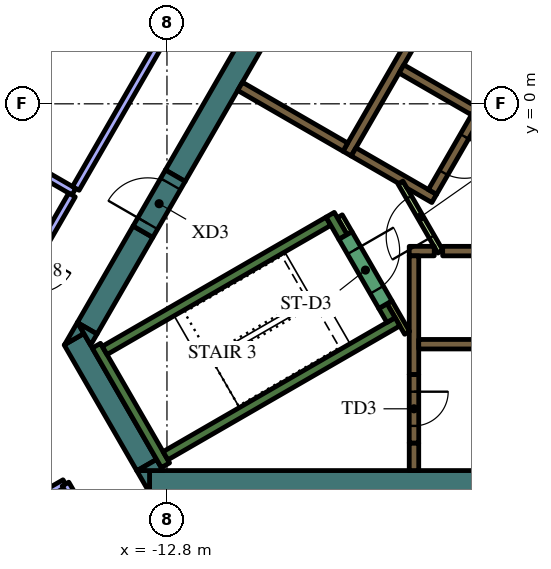
"""IFC4 building model, lengths in metres.
Left out: names, types, materials, properties, quantities, classifications, styles, units other than length and angle.
Written with IfcOpenShell. Run it as: python <this file> out.ifc"""

import sys

from ifc_helpers import new_model, si_unit, direction, frame, frame_2d, origin, place, context, subcontext, project, spatial, polyline, rectangle, outline, extrude, element, fill, save


model = new_model("IFC4")
c1 = context("Model", 3, precision=1e-05, world=origin(), true_north=direction((0.0, 1.0)))
c2 = subcontext(c1, "Body", "Model", "MODEL_VIEW")
j1 = project(units=[si_unit("LENGTHUNIT", "METRE"), si_unit("PLANEANGLEUNIT", "RADIAN")], contexts=[c1])
p1 = place(None, origin())
s1 = spatial("IfcSite", under=j1, at=p1, CompositionType="ELEMENT")
p2 = place(p1, origin())
s2 = spatial("IfcBuilding", under=s1, at=p2, CompositionType="ELEMENT")
p3 = place(p2, frame((0.0, 0.0, 309.0)))
s3 = spatial("IfcBuildingStorey", under=s2, at=p3, CompositionType="ELEMENT", Elevation=309.0)
p4 = place(p3, frame((8.904, -9.95, 0.0), z_axis=(0.0, 0.0, 1.0), x_axis=(-1.0, 0.0, 0.0)))
e1 = element("IfcWall", 1, at=p4, inside=s3, PredefinedType="SOLIDWALL", context=c2, shape_type="SweptSolid", body=[
    extrude(rectangle(XDim=22.161, YDim=0.6, at=frame_2d((11.081, 0.0))), origin(), (0.0, 0.0, 1.0), 4.2),
])
p5 = place(p3, origin())
e2 = element("IfcWall", 2, at=p5, inside=s3, PredefinedType="SOLIDWALL", context=c2, shape_type="SweptSolid", body=[
    extrude(outline(polyline([(-13.597, -9.65), (-13.259, -9.65), (-13.259, -10.236), (-13.597, -9.65)])), origin(), (0.0, 0.0, 1.0), 4.2),
])
p6 = place(p3, frame((-13.333, -9.506, 0.0), z_axis=(0.0, 0.0, 1.0), x_axis=(-0.500019073792, 0.866014391245, 0.0)))
e3 = element("IfcWall", 3, at=p6, inside=s3, PredefinedType="SOLIDWALL", context=c2, shape_type="SweptSolid", body=[
    extrude(rectangle(XDim=3.823, YDim=0.6, at=frame_2d((1.912, 0.0))), origin(), (0.0, 0.0, 1.0), 4.2),
])
e4 = element("IfcWall", 4, at=p5, inside=s3, PredefinedType="SOLIDWALL", context=c2, shape_type="SweptSolid", body=[
    extrude(outline(polyline([(-14.987, -6.043), (-15.493, -6.335), (-15.156, -5.75), (-14.987, -6.043)])), origin(), (0.0, 0.0, 1.0), 4.2),
])
e5 = element("IfcWall", 5, at=p5, inside=s3, PredefinedType="SOLIDWALL", context=c2, shape_type="SweptSolid", body=[
    extrude(outline(polyline([(-12.904, -9.65), (-13.58, -9.65), (-13.073, -9.357), (-12.904, -9.65)])), origin(), (0.0, 0.0, 1.0), 4.2),
])
p7 = place(p3, frame((-13.432, -3.364, 0.0), z_axis=(0.0, 0.0, 1.0), x_axis=(-0.499960127962, -0.866048422692, 0.0)))
e6 = element("IfcWall", 6, at=p7, inside=s3, PredefinedType="SOLIDWALL", context=c2, shape_type="SweptSolid", body=[
    extrude(rectangle(XDim=2.934, YDim=0.6, at=frame_2d((1.467, 0.0))), origin(), (0.0, 0.0, 1.0), 4.2),
])
e7 = element("IfcWall", 7, at=p5, inside=s3, PredefinedType="SOLIDWALL", context=c2, shape_type="SweptSolid", body=[
    extrude(outline(polyline([(-14.809, -6.35), (-15.147, -5.764), (-14.64, -6.057), (-14.809, -6.35)])), origin(), (0.0, 0.0, 1.0), 4.2),
])
p8 = place(p3, frame((-12.582, -1.892, 0.0), z_axis=(0.0, 0.0, 1.0), x_axis=(0.500003640647, 0.866023301845, 0.0)))
e8 = element("IfcWall", 8, at=p8, inside=s3, PredefinedType="SOLIDWALL", context=c2, shape_type="SweptSolid", body=[
    extrude(rectangle(XDim=15.858, YDim=0.6, at=frame_2d((7.929, 0.0))), origin(), (0.0, 0.0, 1.0), 4.2),
])
p9 = place(p3, frame((-12.84, -9.511, 0.0), z_axis=(0.0, 0.0, 1.0), x_axis=(-0.499997733992, 0.866026712061, 0.0)))
e9 = element("IfcWall", 9, at=p9, inside=s3, PredefinedType="SOLIDWALL", context=c2, shape_type="SweptSolid", body=[
    extrude(rectangle(XDim=3.634, YDim=0.25, at=frame_2d((1.817, 0.0))), origin(), (0.0, 0.0, 1.0), 4.2),
])
p10 = place(p3, frame((-14.44, -6.49, 0.0), z_axis=(0.0, 0.0, 1.0), x_axis=(0.866022966069, 0.500004222222, 0.0)))
e10 = element("IfcWall", 10, at=p10, inside=s3, PredefinedType="SOLIDWALL", context=c2, shape_type="SweptSolid", body=[
    extrude(rectangle(XDim=6.8, YDim=0.25, at=frame_2d((3.4, 0.0))), origin(), (0.0, 0.0, 1.0), 4.2),
])
p11 = place(p3, frame((-8.168, -3.503, 0.0), z_axis=(0.0, 0.0, 1.0), x_axis=(-0.499952099219, 0.866053057547, 0.0)))
e11 = element("IfcWall", 11, at=p11, inside=s3, PredefinedType="SOLIDWALL", context=c2, shape_type="SweptSolid", body=[
    extrude(rectangle(XDim=0.675, YDim=0.25, at=frame_2d((0.337, 0.0))), origin(), (0.0, 0.0, 1.0), 4.2),
])
p12 = place(p3, frame((-12.84, -9.261, 0.0), z_axis=(0.0, 0.0, 1.0), x_axis=(0.866016039709, 0.500016218704, 0.0)))
e12 = element("IfcWall", 12, at=p12, inside=s3, PredefinedType="SOLIDWALL", context=c2, shape_type="SweptSolid", body=[
    extrude(rectangle(XDim=7.05, YDim=0.25, at=frame_2d((3.525, 0.0))), origin(), (0.0, 0.0, 1.0), 4.2),
])
p13 = place(p3, frame((-6.905, -5.69, 0.0), z_axis=(0.0, 0.0, 1.0), x_axis=(-0.500402024738, 0.865793170242, 0.0)))
e13 = element("IfcWall", 13, at=p13, inside=s3, PredefinedType="SOLIDWALL", context=c2, shape_type="SweptSolid", body=[
    extrude(rectangle(XDim=0.425, YDim=0.25, at=frame_2d((0.212, 0.0))), origin(), (0.0, 0.0, 1.0), 4.2),
])
p14 = place(p3, frame((-5.545, -3.875, 0.0), z_axis=(0.0, 0.0, 1.0), x_axis=(1.0, 0.0, 0.0)))
e14 = element("IfcWall", 14, at=p14, inside=s3, PredefinedType="SOLIDWALL", context=c2, shape_type="SweptSolid", body=[
    extrude(rectangle(XDim=11.97, YDim=0.25, at=frame_2d((5.985, 0.0))), origin(), (0.0, 0.0, 1.0), 4.2),
])
p15 = place(p3, frame((-6.425, -3.875, 0.0), z_axis=(0.0, 0.0, 1.0), x_axis=(1.0, 0.0, 0.0)))
e15 = element("IfcWall", 15, at=p15, inside=s3, PredefinedType="SOLIDWALL", context=c2, shape_type="SweptSolid", body=[
    extrude(rectangle(XDim=0.658, YDim=0.25, at=frame_2d((0.329, 0.0))), origin(), (0.0, 0.0, 1.0), 4.2),
])
p16 = place(p3, frame((-6.3, -7.125, 0.0), z_axis=(0.0, 0.0, 1.0), x_axis=(0.0, 1.0, 0.0)))
e16 = element("IfcWall", 16, at=p16, inside=s3, PredefinedType="SOLIDWALL", context=c2, shape_type="SweptSolid", body=[
    extrude(rectangle(XDim=3.125, YDim=0.25, at=frame_2d((1.562, 0.0))), origin(), (0.0, 0.0, 1.0), 4.2),
])
p17 = place(p3, frame((-6.3, -8.925, 0.0), z_axis=(0.0, 0.0, 1.0), x_axis=(0.0, -1.0, 0.0)))
e17 = element("IfcWall", 17, at=p17, inside=s3, PredefinedType="SOLIDWALL", context=c2, shape_type="SweptSolid", body=[
    extrude(rectangle(XDim=0.725, YDim=0.25, at=frame_2d((0.363, 0.0))), origin(), (0.0, 0.0, 1.0), 4.2),
])
p18 = place(p3, frame((-8.06, -1.311, 0.0), z_axis=(0.0, 0.0, 1.0), x_axis=(0.50000273126, 0.866023826885, 0.0)))
e18 = element("IfcWall", 18, at=p18, inside=s3, PredefinedType="SOLIDWALL", context=c2, shape_type="SweptSolid", body=[
    extrude(rectangle(XDim=10.33, YDim=0.25, at=frame_2d((5.165, 0.0))), origin(), (0.0, 0.0, 1.0), 4.2),
])
p19 = place(p3, frame((-4.724, -0.182, 0.0), z_axis=(0.0, 0.0, 1.0), x_axis=(-0.866008176907, 0.50002983664, 0.0)))
e19 = element("IfcWall", 19, at=p19, inside=s3, PredefinedType="SOLIDWALL", context=c2, shape_type="SweptSolid", body=[
    extrude(rectangle(XDim=2.2, YDim=0.25, at=frame_2d((1.1, 0.0))), origin(), (0.0, 0.0, 1.0), 4.2),
])
e20 = element("IfcWall", 20, at=p5, inside=s3, PredefinedType="SOLIDWALL", context=c2, shape_type="SweptSolid", body=[
    extrude(outline(polyline([(-5.922, -2.257), (-5.922, -2.257), (-5.705, -2.382), (-5.83, -2.598), (-6.483, -2.221), (-6.591, -2.033), (-6.591, -2.033), (-6.7, -2.096), (-7.952, -1.373), (-7.827, -1.156), (-5.922, -2.257)])), origin(), (0.0, 0.0, 1.0), 4.2),
])
p20 = place(p3, frame((-8.106, -1.14, 0.0), z_axis=(0.0, 0.0, 1.0), x_axis=(-0.866008981251, 0.500028443584, 0.0)))
e21 = element("IfcWall", 21, at=p20, inside=s3, PredefinedType="SOLIDWALL", context=c2, shape_type="SweptSolid", body=[
    extrude(rectangle(XDim=3.2, YDim=0.25, at=frame_2d((1.6, 0.0))), origin(), (0.0, 0.0, 1.0), 4.2),
])
p21 = place(p3, frame((-8.252, -2.958, 0.0), z_axis=(0.0, 0.0, 1.0), x_axis=(0.500174715838, -0.865924508047, 0.0)))
e22 = element("IfcWall", 22, at=p21, inside=s3, PredefinedType="PARTITIONING", context=c2, shape_type="SweptSolid", body=[
    extrude(rectangle(XDim=0.514, YDim=0.15, at=frame_2d((0.257, 0.0))), origin(), (0.0, 0.0, 1.0), 3.55),
])
p22 = place(p3, frame((-6.48, -6.027, 0.0), z_axis=(0.0, 0.0, 1.0), x_axis=(-0.499927229454, 0.866067413802, 0.0)))
e23 = element("IfcWall", 23, at=p22, inside=s3, PredefinedType="PARTITIONING", context=c2, shape_type="SweptSolid", body=[
    extrude(rectangle(XDim=0.929, YDim=0.15, at=frame_2d((0.464, 0.0))), origin(), (0.0, 0.0, 1.0), 4.2),
])
p23 = place(p3, frame((-6.175, -6.325, 0.0), z_axis=(0.0, 0.0, 1.0), x_axis=(1.0, 0.0, 0.0)))
e24 = element("IfcWall", 24, at=p23, inside=s3, PredefinedType="SOLIDWALL", context=c2, shape_type="SweptSolid", body=[
    extrude(rectangle(XDim=12.35, YDim=0.25, at=frame_2d((6.175, 0.0))), origin(), (0.0, 0.0, 1.0), 4.2),
])
p24 = place(p23, frame((3.205, 0.0, 0.0)))
e25 = element("IfcOpeningElement", 25, at=p24, cuts=e24, PredefinedType="OPENING", context=c2, shape_type="SweptSolid", body=[
    extrude(rectangle(XDim=0.9, YDim=2.1, at=frame_2d((0.45, 1.05))), frame((0.0, 0.135, 0.0), z_axis=(0.0, -1.0, 0.0), x_axis=(1.0, 0.0, 0.0)), (0.0, 0.0, 1.0), 0.27),
])
p25 = place(p23, frame((8.145, 0.0, 0.0)))
e26 = element("IfcOpeningElement", 26, at=p25, cuts=e24, PredefinedType="OPENING", context=c2, shape_type="SweptSolid", body=[
    extrude(rectangle(XDim=1.1, YDim=2.1, at=frame_2d((0.55, 1.05))), frame((0.0, 0.135, 0.0), z_axis=(0.0, -1.0, 0.0), x_axis=(1.0, 0.0, 0.0)), (0.0, 0.0, 1.0), 0.27),
])
p26 = place(p23, frame((10.665, 0.0, 0.0)))
e27 = element("IfcOpeningElement", 27, at=p26, cuts=e24, PredefinedType="OPENING", context=c2, shape_type="SweptSolid", body=[
    extrude(rectangle(XDim=1.1, YDim=2.1, at=frame_2d((0.55, 1.05))), frame((0.0, 0.135, 0.0), z_axis=(0.0, -1.0, 0.0), x_axis=(1.0, 0.0, 0.0)), (0.0, 0.0, 1.0), 0.27),
])
p27 = place(p3, frame((-0.898, 6.194, 0.0), z_axis=(0.0, 0.0, 1.0), x_axis=(-0.499996202215, -0.866027596426, 0.0)))
e28 = element("IfcWall", 28, at=p27, inside=s3, PredefinedType="SOLIDWALL", context=c2, shape_type="SweptSolid", body=[
    extrude(rectangle(XDim=9.83, YDim=0.25, at=frame_2d((4.915, 0.0))), origin(), (0.0, 0.0, 1.0), 4.2),
])
p28 = place(p27, frame((0.585, 0.0, 0.0)))
e29 = element("IfcOpeningElement", 29, at=p28, cuts=e28, PredefinedType="OPENING", context=c2, shape_type="SweptSolid", body=[
    extrude(rectangle(XDim=1.1, YDim=2.1, at=frame_2d((0.55, 1.05))), frame((0.0, 0.135, 0.0), z_axis=(0.0, -1.0, 0.0), x_axis=(1.0, 0.0, 0.0)), (0.0, 0.0, 1.0), 0.27),
])
p29 = place(p27, frame((3.105, 0.0, 0.0)))
e30 = element("IfcOpeningElement", 30, at=p29, cuts=e28, PredefinedType="OPENING", context=c2, shape_type="SweptSolid", body=[
    extrude(rectangle(XDim=1.1, YDim=2.1, at=frame_2d((0.55, 1.05))), frame((0.0, 0.135, 0.0), z_axis=(0.0, -1.0, 0.0), x_axis=(1.0, 0.0, 0.0)), (0.0, 0.0, 1.0), 0.27),
])
p30 = place(p27, frame((5.625, 0.0, 0.0)))
e31 = element("IfcOpeningElement", 31, at=p30, cuts=e28, PredefinedType="OPENING", context=c2, shape_type="SweptSolid", body=[
    extrude(rectangle(XDim=1.1, YDim=2.1, at=frame_2d((0.55, 1.05))), frame((0.0, 0.135, 0.0), z_axis=(0.0, -1.0, 0.0), x_axis=(1.0, 0.0, 0.0)), (0.0, 0.0, 1.0), 0.27),
])
p31 = place(p27, frame((8.145, 0.0, 0.0)))
e32 = element("IfcOpeningElement", 32, at=p31, cuts=e28, PredefinedType="OPENING", context=c2, shape_type="SweptSolid", body=[
    extrude(rectangle(XDim=1.1, YDim=2.1, at=frame_2d((0.55, 1.05))), frame((0.0, 0.135, 0.0), z_axis=(0.0, -1.0, 0.0), x_axis=(1.0, 0.0, 0.0)), (0.0, 0.0, 1.0), 0.27),
])
p32 = place(p3, frame((-8.103, -3.466, 0.0), z_axis=(0.0, 0.0, 1.0), x_axis=(0.500078061341, -0.865980330357, 0.0)))
e33 = element("IfcWall", 33, at=p32, inside=s3, PredefinedType="SOLIDWALL", context=c2, shape_type="SweptSolid", body=[
    extrude(rectangle(XDim=2.1, YDim=0.4, at=frame_2d((1.05, 0.0))), origin(), (0.0, 0.0, 1.0), 4.2),
])
p33 = place(p32, frame((0.45, 0.0, 0.0)))
e34 = element("IfcOpeningElement", 34, at=p33, cuts=e33, PredefinedType="OPENING", context=c2, shape_type="SweptSolid", body=[
    extrude(rectangle(XDim=1.2, YDim=2.1, at=frame_2d((0.6, 1.05))), frame((0.0, 0.21, 0.0), z_axis=(0.0, -1.0, 0.0), x_axis=(1.0, 0.0, 0.0)), (0.0, 0.0, 1.0), 0.42),
])
p34 = place(p3, frame((-6.3, -7.125, 0.0), z_axis=(0.0, 0.0, 1.0), x_axis=(0.0, -1.0, 0.0)))
e35 = element("IfcWall", 35, at=p34, inside=s3, PredefinedType="SOLIDWALL", context=c2, shape_type="SweptSolid", body=[
    extrude(rectangle(XDim=1.8, YDim=0.25, at=frame_2d((0.9, 0.0))), origin(), (0.0, 0.0, 1.0), 4.2),
])
p35 = place(p34, frame((0.45, 0.0, 0.0)))
e36 = element("IfcOpeningElement", 36, at=p35, cuts=e35, PredefinedType="OPENING", context=c2, shape_type="SweptSolid", body=[
    extrude(rectangle(XDim=0.9, YDim=2.1, at=frame_2d((0.45, 1.05))), frame((0.0, 0.135, 0.0), z_axis=(0.0, -1.0, 0.0), x_axis=(1.0, 0.0, 0.0)), (0.0, 0.0, 1.0), 0.27),
])
p36 = place(p3, frame((-5.606, -3.89, 0.0), z_axis=(0.0, 0.0, 1.0), x_axis=(-0.500027713859, 0.866009402589, 0.0)))
e37 = element("IfcWall", 37, at=p36, inside=s3, PredefinedType="PARTITIONING", context=c2, shape_type="SweptSolid", body=[
    extrude(rectangle(XDim=2.1, YDim=0.15, at=frame_2d((1.05, 0.0))), origin(), (0.0, 0.0, 1.0), 3.55),
])
p37 = place(p36, frame((0.45, 0.0, 0.0)))
e38 = element("IfcOpeningElement", 38, at=p37, cuts=e37, PredefinedType="OPENING", context=c2, shape_type="SweptSolid", body=[
    extrude(rectangle(XDim=1.2, YDim=2.1, at=frame_2d((0.6, 1.05))), frame((0.0, 0.085, 0.0), z_axis=(0.0, -1.0, 0.0), x_axis=(1.0, 0.0, 0.0)), (0.0, 0.0, 1.0), 0.17),
])
p38 = place(p3, frame((-13.432, -3.364, 0.0), z_axis=(0.0, 0.0, 1.0), x_axis=(0.500062241894, 0.865989465428, 0.0)))
e39 = element("IfcWall", 39, at=p38, inside=s3, PredefinedType="SOLIDWALL", context=c2, shape_type="SweptSolid", body=[
    extrude(rectangle(XDim=1.7, YDim=0.6, at=frame_2d((0.85, 0.0))), origin(), (0.0, 0.0, 1.0), 4.2),
])
p39 = place(p38, frame((0.25, 0.0, 0.0)))
e40 = element("IfcOpeningElement", 40, at=p39, cuts=e39, PredefinedType="OPENING", context=c2, shape_type="SweptSolid", body=[
    extrude(rectangle(XDim=1.2, YDim=2.1, at=frame_2d((0.6, 1.05))), frame((0.0, 0.31, 0.0), z_axis=(0.0, -1.0, 0.0), x_axis=(1.0, 0.0, 0.0)), (0.0, 0.0, 1.0), 0.62),
])
p40 = place(p3, frame((-15.249, -2.312, 0.0), z_axis=(0.0, 0.0, 1.0), x_axis=(-0.866053113424, 0.499952002425, 0.0)))
e41 = element("IfcWall", 41, at=p40, inside=s3, PredefinedType="PARTITIONING", context=c2, shape_type="SweptSolid", body=[
    extrude(rectangle(XDim=3.161, YDim=0.2, at=frame_2d((1.581, 0.0))), origin(), (0.0, 0.0, 1.0), 3.55),
])
p41 = place(p3, frame((-12.701, 2.102, 0.0), z_axis=(0.0, 0.0, 1.0), x_axis=(-0.499974782844, -0.866039962427, 0.0)))
e42 = element("IfcWall", 42, at=p41, inside=s3, PredefinedType="PARTITIONING", context=c2, shape_type="SweptSolid", body=[
    extrude(rectangle(XDim=4.997, YDim=0.2, at=frame_2d((2.499, 0.0))), origin(), (0.0, 0.0, 1.0), 3.55),
])
p42 = place(p3, frame((-15.299, -2.399, 0.0), z_axis=(0.0, 0.0, 1.0), x_axis=(-0.49998958839, -0.866031414847, 0.0)))
e43 = element("IfcWall", 43, at=p42, inside=s3, PredefinedType="PARTITIONING", context=c2, shape_type="SweptSolid", body=[
    extrude(rectangle(XDim=4.562, YDim=0.2, at=frame_2d((2.281, 0.0))), origin(), (0.0, 0.0, 1.0), 3.55),
])
p43 = place(p42, frame((1.8, 0.0, 0.0)))
e44 = element("IfcOpeningElement", 44, at=p43, cuts=e43, PredefinedType="OPENING", context=c2, shape_type="SweptSolid", body=[
    extrude(rectangle(XDim=1.0, YDim=2.1, at=frame_2d((0.5, 1.05))), frame((0.0, 0.11, 0.0), z_axis=(0.0, -1.0, 0.0), x_axis=(1.0, 0.0, 0.0)), (0.0, 0.0, 1.0), 0.22),
])
p44 = place(p3, frame((-17.364, -11.064, 0.0), z_axis=(0.0, 0.0, 1.0), x_axis=(0.866018827591, 0.500011390128, 0.0)))
e45 = element("IfcWall", 45, at=p44, inside=s3, PredefinedType="PARTITIONING", context=c2, shape_type="SweptSolid", body=[
    extrude(rectangle(XDim=2.17, YDim=0.2, at=frame_2d((1.085, 0.0))), origin(), (0.0, 0.0, 1.0), 3.55),
])
p45 = place(p3, frame((-15.47, -10.005, 0.0), z_axis=(0.0, 0.0, 1.0), x_axis=(0.500053625724, -0.865994440744, 0.0)))
e46 = element("IfcWall", 46, at=p45, inside=s3, PredefinedType="PARTITIONING", context=c2, shape_type="SweptSolid", body=[
    extrude(rectangle(XDim=2.361, YDim=0.2, at=frame_2d((1.181, 0.0))), origin(), (0.0, 0.0, 1.0), 3.55),
])
p46 = place(p31, origin())
e47 = element("IfcDoor", 47, at=p46, inside=s3, OperationType="DOUBLE_DOOR_SLIDING", PredefinedType="DOOR", context=c2, shape_type="SweptSolid", body=[
    extrude(rectangle(XDim=1.1, YDim=2.1, at=frame_2d((0.55, 1.05))), frame((0.0, 0.025, 0.0), z_axis=(0.0, -1.0, 0.0), x_axis=(1.0, 0.0, 0.0)), (0.0, 0.0, 1.0), 0.05),
])
fill(e32, e47)
p47 = place(p33, origin())
e48 = element("IfcDoor", 48, at=p47, inside=s3, OperationType="SINGLE_SWING_LEFT", PredefinedType="DOOR", context=c2, shape_type="SweptSolid", body=[
    extrude(rectangle(XDim=1.2, YDim=2.1, at=frame_2d((0.6, 1.05))), frame((0.0, 0.025, 0.0), z_axis=(0.0, -1.0, 0.0), x_axis=(1.0, 0.0, 0.0)), (0.0, 0.0, 1.0), 0.05),
])
fill(e34, e48)
p48 = place(p35, origin())
e49 = element("IfcDoor", 49, at=p48, inside=s3, OperationType="SINGLE_SWING_LEFT", PredefinedType="DOOR", context=c2, shape_type="SweptSolid", body=[
    extrude(rectangle(XDim=0.9, YDim=2.1, at=frame_2d((0.45, 1.05))), frame((0.0, 0.025, 0.0), z_axis=(0.0, -1.0, 0.0), x_axis=(1.0, 0.0, 0.0)), (0.0, 0.0, 1.0), 0.05),
])
fill(e36, e49)
p49 = place(p37, origin())
e50 = element("IfcDoor", 50, at=p49, inside=s3, OperationType="SINGLE_SWING_LEFT", PredefinedType="DOOR", context=c2, shape_type="SweptSolid", body=[
    extrude(rectangle(XDim=1.2, YDim=2.1, at=frame_2d((0.6, 1.05))), frame((0.0, 0.025, 0.0), z_axis=(0.0, -1.0, 0.0), x_axis=(1.0, 0.0, 0.0)), (0.0, 0.0, 1.0), 0.05),
])
fill(e38, e50)
p50 = place(p39, origin())
e51 = element("IfcDoor", 51, at=p50, inside=s3, OperationType="SINGLE_SWING_LEFT", PredefinedType="DOOR", context=c2, shape_type="SweptSolid", body=[
    extrude(rectangle(XDim=1.2, YDim=2.1, at=frame_2d((0.6, 1.05))), frame((0.0, 0.025, 0.0), z_axis=(0.0, -1.0, 0.0), x_axis=(1.0, 0.0, 0.0)), (0.0, 0.0, 1.0), 0.05),
])
fill(e40, e51)
save(model, sys.argv[1])
